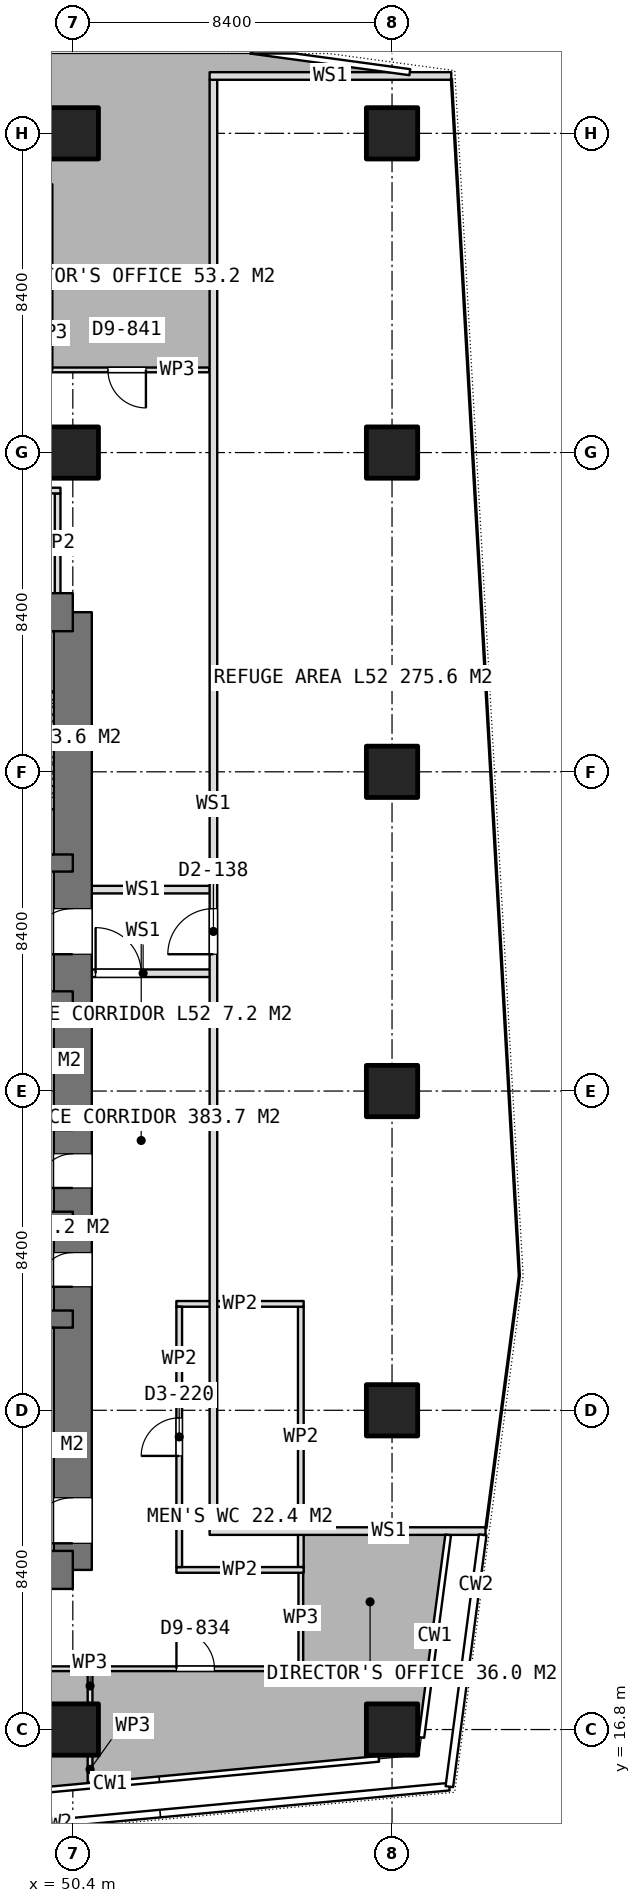
"""IFC4 building model, lengths in metres.
Left out: names, types, materials, properties, quantities, classifications, styles, units other than length and angle.
Written with IfcOpenShell. Run it as: python <this file> out.ifc"""

import sys

from ifc_helpers import new_model, si_unit, direction, frame, frame_2d, origin, origin_2d, place, context, subcontext, project, spatial, rectangle, extrude, element, fill, save


model = new_model("IFC4")
c1 = context("Model", 3, precision=1e-05, world=origin(), true_north=direction((0.0, 1.0)))
c2 = subcontext(c1, "Body", "Model", "MODEL_VIEW")
j1 = project(units=[si_unit("LENGTHUNIT", "METRE"), si_unit("PLANEANGLEUNIT", "RADIAN")], contexts=[c1])
p1 = place(None, origin())
s1 = spatial("IfcSite", under=j1, at=p1, CompositionType="ELEMENT")
p2 = place(p1, origin())
s2 = spatial("IfcBuilding", under=s1, at=p2, CompositionType="ELEMENT")
p3 = place(p2, frame((0.0, 0.0, 206.45)))
s3 = spatial("IfcBuildingStorey", under=s2, at=p3, CompositionType="ELEMENT", Elevation=206.45)
for number, where, z_axis, x_axis in (
    (1, (40.0, 21.0, 0.0), (0.0, 0.0, 1.0), (1.0, 0.0, 0.0)),
    (2, (40.0, 46.2, 0.0), (0.0, 0.0, 1.0), (1.0, 0.0, 0.0)),
):
    element("IfcWall", number, at=place(p3, frame(where, z_axis=z_axis, x_axis=x_axis)), inside=s3, PredefinedType="SHEAR", context=c2, shape_type="SweptSolid", body=[
        extrude(rectangle(XDim=10.4, YDim=1.0, at=frame_2d((5.2, 0.0))), origin(), (0.0, 0.0, 1.0), 3.75),
    ])
p4 = place(p3, frame((50.4, 21.0, 0.0), z_axis=(0.0, 0.0, 1.0), x_axis=(0.0, 1.0, 0.0)))
e3 = element("IfcWall", 3, at=p4, inside=s3, PredefinedType="SHEAR", context=c2, shape_type="SweptSolid", body=[
    extrude(rectangle(XDim=25.2, YDim=1.0, at=frame_2d((12.6, 0.0))), origin(), (0.0, 0.0, 1.0), 3.75),
])
p5 = place(p4, frame((16.2, 0.0, 0.0)))
e4 = element("IfcOpeningElement", 4, at=p5, cuts=e3, PredefinedType="OPENING", context=c2, shape_type="SweptSolid", body=[
    extrude(rectangle(XDim=1.2, YDim=2.1, at=frame_2d((0.6, 1.05))), frame((0.0, 0.51, 0.0), z_axis=(0.0, -1.0, 0.0), x_axis=(1.0, 0.0, 0.0)), (0.0, 0.0, 1.0), 1.02),
])
p6 = place(p4, frame((10.05, 0.0, 0.0)))
e5 = element("IfcOpeningElement", 5, at=p6, cuts=e3, PredefinedType="OPENING", context=c2, shape_type="SweptSolid", body=[
    extrude(rectangle(XDim=0.9, YDim=2.1, at=frame_2d((0.45, 1.05))), frame((0.0, 0.51, 0.0), z_axis=(0.0, -1.0, 0.0), x_axis=(1.0, 0.0, 0.0)), (0.0, 0.0, 1.0), 1.02),
])
p7 = place(p4, frame((7.45, 0.0, 0.0)))
e6 = element("IfcOpeningElement", 6, at=p7, cuts=e3, PredefinedType="OPENING", context=c2, shape_type="SweptSolid", body=[
    extrude(rectangle(XDim=0.9, YDim=2.1, at=frame_2d((0.45, 1.05))), frame((0.0, 0.51, 0.0), z_axis=(0.0, -1.0, 0.0), x_axis=(1.0, 0.0, 0.0)), (0.0, 0.0, 1.0), 1.02),
])
p8 = place(p4, frame((0.7, 0.0, 0.0)))
e7 = element("IfcOpeningElement", 7, at=p8, cuts=e3, PredefinedType="OPENING", context=c2, shape_type="SweptSolid", body=[
    extrude(rectangle(XDim=1.2, YDim=2.1, at=frame_2d((0.6, 1.05))), frame((0.0, 0.51, 0.0), z_axis=(0.0, -1.0, 0.0), x_axis=(1.0, 0.0, 0.0)), (0.0, 0.0, 1.0), 1.02),
])
for number, where, z_axis, x_axis in (
    (8, (43.8, 27.6, 0.0), (0.0, 0.0, 1.0), (1.0, 0.0, 0.0)),
    (9, (43.8, 30.2, 0.0), (0.0, 0.0, 1.0), (1.0, 0.0, 0.0)),
    (10, (43.8, 32.8, 0.0), (0.0, 0.0, 1.0), (1.0, 0.0, 0.0)),
):
    element("IfcWall", number, at=place(p3, frame(where, z_axis=z_axis, x_axis=x_axis)), inside=s3, PredefinedType="SHEAR", context=c2, shape_type="SweptSolid", body=[
        extrude(rectangle(XDim=6.6, YDim=0.45, at=frame_2d((3.3, 0.0))), origin(), (0.0, 0.0, 1.0), 3.75),
    ])
p9 = place(p3, frame((43.8, 36.0, 0.0), z_axis=(0.0, 0.0, 1.0), x_axis=(1.0, 0.0, 0.0)))
e11 = element("IfcWall", 11, at=p9, inside=s3, PredefinedType="SHEAR", context=c2, shape_type="SweptSolid", body=[
    extrude(rectangle(XDim=6.6, YDim=0.45, at=frame_2d((3.3, 0.0))), origin(), (0.0, 0.0, 1.0), 3.75),
])
p10 = place(p9, frame((2.65, 0.0, 0.0)))
e12 = element("IfcOpeningElement", 12, at=p10, cuts=e11, PredefinedType="OPENING", context=c2, shape_type="SweptSolid", body=[
    extrude(rectangle(XDim=1.3, YDim=2.1, at=frame_2d((0.65, 1.05))), frame((0.0, 0.235, 0.0), z_axis=(0.0, -1.0, 0.0), x_axis=(1.0, 0.0, 0.0)), (0.0, 0.0, 1.0), 0.47),
])
p11 = place(p3, frame((43.8, 39.6, 0.0), z_axis=(0.0, 0.0, 1.0), x_axis=(1.0, 0.0, 0.0)))
e13 = element("IfcWall", 13, at=p11, inside=s3, PredefinedType="SHEAR", context=c2, shape_type="SweptSolid", body=[
    extrude(rectangle(XDim=6.6, YDim=0.45, at=frame_2d((3.3, 0.0))), origin(), (0.0, 0.0, 1.0), 3.75),
])
p12 = place(p11, frame((0.425, 0.0, 0.0)))
e14 = element("IfcOpeningElement", 14, at=p12, cuts=e13, PredefinedType="OPENING", context=c2, shape_type="SweptSolid", body=[
    extrude(rectangle(XDim=1.2, YDim=2.1, at=frame_2d((0.6, 1.05))), frame((0.0, 0.235, 0.0), z_axis=(0.0, -1.0, 0.0), x_axis=(1.0, 0.0, 0.0)), (0.0, 0.0, 1.0), 0.47),
])
for number, where, z_axis, x_axis in (
    (15, (50.4, 16.8, 0.0), (0.0, 0.0, 1.0), (1.0, 0.0, 0.0)),
    (16, (50.4, 50.4, 0.0), (0.0, 0.0, 1.0), (1.0, 0.0, 0.0)),
    (17, (50.4, 58.8, 0.0), (0.0, 0.0, 1.0), (1.0, 0.0, 0.0)),
    (18, (58.8, 16.8, 0.0), (0.0, 0.0, 1.0), (1.0, 0.0, 0.0)),
    (19, (58.8, 25.2, 0.0), (0.0, 0.0, 1.0), (1.0, 0.0, 0.0)),
    (20, (58.8, 33.6, 0.0), (0.0, 0.0, 1.0), (1.0, 0.0, 0.0)),
    (21, (58.8, 42.0, 0.0), (0.0, 0.0, 1.0), (1.0, 0.0, 0.0)),
    (22, (58.8, 50.4, 0.0), (0.0, 0.0, 1.0), (1.0, 0.0, 0.0)),
    (23, (58.8, 58.8, 0.0), (0.0, 0.0, 1.0), (1.0, 0.0, 0.0)),
):
    element("IfcColumn", number, at=place(p3, frame(where, z_axis=z_axis, x_axis=x_axis)), inside=s3, PredefinedType="COLUMN", context=c2, shape_type="SweptSolid", body=[
        extrude(rectangle(XDim=1.35, YDim=1.35, at=origin_2d()), origin(), (0.0, 0.0, 1.0), 3.75),
    ])
p13 = place(p3, frame((40.325, 49.4, 0.0), z_axis=(0.0, 0.0, 1.0), x_axis=(1.0, 0.0, 0.0)))
e24 = element("IfcWall", 24, at=p13, inside=s3, PredefinedType="PARTITIONING", context=c2, shape_type="SweptSolid", body=[
    extrude(rectangle(XDim=9.75, YDim=0.15, at=frame_2d((4.875, 0.0))), origin(), (0.0, 0.0, 1.0), 3.5),
])
p14 = place(p13, frame((4.375, 0.0, 0.0)))
e25 = element("IfcOpeningElement", 25, at=p14, cuts=e24, PredefinedType="OPENING", context=c2, shape_type="SweptSolid", body=[
    extrude(rectangle(XDim=1.0, YDim=2.1, at=frame_2d((0.5, 1.05))), frame((0.0, 0.085, 0.0), z_axis=(0.0, -1.0, 0.0), x_axis=(1.0, 0.0, 0.0)), (0.0, 0.0, 1.0), 0.17),
])
p15 = place(p3, frame((50.0, 46.7, 0.0), z_axis=(0.0, 0.0, 1.0), x_axis=(0.0, 1.0, 0.0)))
e26 = element("IfcWall", 26, at=p15, inside=s3, PredefinedType="PARTITIONING", context=c2, shape_type="SweptSolid", body=[
    extrude(rectangle(XDim=2.625, YDim=0.15, at=frame_2d((1.312, 0.0))), origin(), (0.0, 0.0, 1.0), 3.5),
])
for number, where, z_axis, x_axis in (
    (27, (53.125, 21.0, 0.0), (0.0, 0.0, 1.0), (1.0, 0.0, 0.0)),
    (28, (53.125, 28.0, 0.0), (0.0, 0.0, 1.0), (1.0, 0.0, 0.0)),
):
    element("IfcWall", number, at=place(p3, frame(where, z_axis=z_axis, x_axis=x_axis)), inside=s3, PredefinedType="PARTITIONING", context=c2, shape_type="SweptSolid", body=[
        extrude(rectangle(XDim=3.35, YDim=0.15, at=frame_2d((1.675, 0.0))), origin(), (0.0, 0.0, 1.0), 3.5),
    ])
p16 = place(p3, frame((53.2, 21.075, 0.0), z_axis=(0.0, 0.0, 1.0), x_axis=(0.0, 1.0, 0.0)))
e29 = element("IfcWall", 29, at=p16, inside=s3, PredefinedType="PARTITIONING", context=c2, shape_type="SweptSolid", body=[
    extrude(rectangle(XDim=6.85, YDim=0.15, at=frame_2d((3.425, 0.0))), origin(), (0.0, 0.0, 1.0), 3.5),
])
p17 = place(p16, frame((2.925, 0.0, 0.0)))
e30 = element("IfcOpeningElement", 30, at=p17, cuts=e29, PredefinedType="OPENING", context=c2, shape_type="SweptSolid", body=[
    extrude(rectangle(XDim=1.0, YDim=2.1, at=frame_2d((0.5, 1.05))), frame((0.0, 0.085, 0.0), z_axis=(0.0, -1.0, 0.0), x_axis=(1.0, 0.0, 0.0)), (0.0, 0.0, 1.0), 0.17),
])
p18 = place(p3, frame((56.4, 21.075, 0.0), z_axis=(0.0, 0.0, 1.0), x_axis=(0.0, 1.0, 0.0)))
e31 = element("IfcWall", 31, at=p18, inside=s3, PredefinedType="PARTITIONING", context=c2, shape_type="SweptSolid", body=[
    extrude(rectangle(XDim=6.85, YDim=0.15, at=frame_2d((3.425, 0.0))), origin(), (0.0, 0.0, 1.0), 3.5),
])
p19 = place(p3, frame((50.854, 15.401, 0.0), z_axis=(0.0, 0.0, 1.0), x_axis=(0.0, 1.0, 0.0)))
e32 = element("IfcWall", 32, at=p19, inside=s3, PredefinedType="PARTITIONING", context=c2, shape_type="SweptSolid", body=[
    extrude(rectangle(XDim=0.704, YDim=0.125, at=frame_2d((0.352, 0.0))), origin(), (0.0, 0.0, 1.0), 3.5),
])
p20 = place(p3, frame((50.854, 17.495, 0.0), z_axis=(0.0, 0.0, 1.0), x_axis=(0.0, 1.0, 0.0)))
e33 = element("IfcWall", 33, at=p20, inside=s3, PredefinedType="PARTITIONING", context=c2, shape_type="SweptSolid", body=[
    extrude(rectangle(XDim=0.905, YDim=0.125, at=frame_2d((0.452, 0.0))), origin(), (0.0, 0.0, 1.0), 3.5),
])
p21 = place(p3, frame((50.854, 18.4, 0.0), z_axis=(0.0, 0.0, 1.0), x_axis=(1.0, 0.0, 0.0)))
e34 = element("IfcWall", 34, at=p21, inside=s3, PredefinedType="PARTITIONING", context=c2, shape_type="SweptSolid", body=[
    extrude(rectangle(XDim=5.546, YDim=0.125, at=frame_2d((2.773, 0.0))), origin(), (0.0, 0.0, 1.0), 3.5),
])
p22 = place(p21, frame((2.273, 0.0, 0.0)))
e35 = element("IfcOpeningElement", 35, at=p22, cuts=e34, PredefinedType="OPENING", context=c2, shape_type="SweptSolid", body=[
    extrude(rectangle(XDim=1.0, YDim=2.1, at=frame_2d((0.5, 1.05))), frame((0.0, 0.073, 0.0), z_axis=(0.0, -1.0, 0.0), x_axis=(1.0, 0.0, 0.0)), (0.0, 0.0, 1.0), 0.145),
])
p23 = place(p3, frame((56.4, 18.4, 0.0), z_axis=(0.0, 0.0, 1.0), x_axis=(0.0, 1.0, 0.0)))
e36 = element("IfcWall", 36, at=p23, inside=s3, PredefinedType="PARTITIONING", context=c2, shape_type="SweptSolid", body=[
    extrude(rectangle(XDim=2.675, YDim=0.125, at=frame_2d((1.337, 0.0))), origin(), (0.0, 0.0, 1.0), 3.5),
])
p24 = place(p3, frame((53.989, 52.575, 0.0), z_axis=(0.0, 0.0, 1.0), x_axis=(-1.0, 0.0, 0.0)))
e37 = element("IfcWall", 37, at=p24, inside=s3, PredefinedType="PARTITIONING", context=c2, shape_type="SweptSolid", body=[
    extrude(rectangle(XDim=4.19, YDim=0.125, at=frame_2d((2.095, 0.0))), origin(), (0.0, 0.0, 1.0), 3.5),
])
p25 = place(p24, frame((1.665, 0.0, 0.0)))
e38 = element("IfcOpeningElement", 38, at=p25, cuts=e37, PredefinedType="OPENING", context=c2, shape_type="SweptSolid", body=[
    extrude(rectangle(XDim=1.0, YDim=2.1, at=frame_2d((0.5, 1.05))), frame((0.0, 0.073, 0.0), z_axis=(0.0, -1.0, 0.0), x_axis=(1.0, 0.0, 0.0)), (0.0, 0.0, 1.0), 0.145),
])
p26 = place(p3, frame((49.799, 52.575, 0.0), z_axis=(0.0, 0.0, 1.0), x_axis=(0.0, 1.0, 0.0)))
e39 = element("IfcWall", 39, at=p26, inside=s3, PredefinedType="PARTITIONING", context=c2, shape_type="SweptSolid", body=[
    extrude(rectangle(XDim=4.884, YDim=0.125, at=frame_2d((2.442, 0.0))), origin(), (0.0, 0.0, 1.0), 3.5),
])
p27 = place(p3, frame((35.508, 18.4, 0.0), z_axis=(0.0, 0.0, 1.0), x_axis=(1.0, 0.0, 0.0)))
e40 = element("IfcWall", 40, at=p27, inside=s3, PredefinedType="PARTITIONING", context=c2, shape_type="SweptSolid", body=[
    extrude(rectangle(XDim=15.346, YDim=0.125, at=frame_2d((7.673, 0.0))), origin(), (0.0, 0.0, 1.0), 3.5),
])
p28 = place(p27, frame((7.273, 0.0, 0.0)))
e41 = element("IfcOpeningElement", 41, at=p28, cuts=e40, PredefinedType="OPENING", context=c2, shape_type="SweptSolid", body=[
    extrude(rectangle(XDim=1.8, YDim=2.1, at=frame_2d((0.9, 1.05))), frame((0.0, 0.073, 0.0), z_axis=(0.0, -1.0, 0.0), x_axis=(1.0, 0.0, 0.0)), (0.0, 0.0, 1.0), 0.145),
])
p29 = place(p3, frame((54.1, 22.122, 0.0), z_axis=(0.0, 0.0, 1.0), x_axis=(0.0, 1.0, 0.0)))
e42 = element("IfcWall", 42, at=p29, inside=s3, PredefinedType="PARTITIONING", context=c2, shape_type="SweptSolid", body=[
    extrude(rectangle(XDim=38.087, YDim=0.2, at=frame_2d((19.043, 0.0))), origin(), (0.0, 0.0, 1.0), 3.5),
])
p30 = place(p29, frame((15.078, 0.0, 0.0)))
e43 = element("IfcOpeningElement", 43, at=p30, cuts=e42, PredefinedType="OPENING", context=c2, shape_type="SweptSolid", body=[
    extrude(rectangle(XDim=1.2, YDim=2.1, at=frame_2d((0.6, 1.05))), frame((0.0, 0.11, 0.0), z_axis=(0.0, -1.0, 0.0), x_axis=(1.0, 0.0, 0.0)), (0.0, 0.0, 1.0), 0.22),
])
p31 = place(p3, frame((54.0, 22.022, 0.0), z_axis=(0.0, 0.0, 1.0), x_axis=(1.0, 0.0, 0.0)))
e44 = element("IfcWall", 44, at=p31, inside=s3, PredefinedType="PARTITIONING", context=c2, shape_type="SweptSolid", body=[
    extrude(rectangle(XDim=7.26, YDim=0.2, at=frame_2d((3.63, 0.0))), origin(), (0.0, 0.0, 1.0), 3.5),
])
p32 = place(p3, frame((54.0, 60.309, 0.0), z_axis=(0.0, 0.0, 1.0), x_axis=(1.0, 0.0, 0.0)))
e45 = element("IfcWall", 45, at=p32, inside=s3, PredefinedType="PARTITIONING", context=c2, shape_type="SweptSolid", body=[
    extrude(rectangle(XDim=6.358, YDim=0.2, at=frame_2d((3.179, 0.0))), origin(), (0.0, 0.0, 1.0), 3.5),
])
p33 = place(p3, frame((50.4, 38.9, 0.0), z_axis=(0.0, 0.0, 1.0), x_axis=(1.0, 0.0, 0.0)))
e46 = element("IfcWall", 46, at=p33, inside=s3, PredefinedType="PARTITIONING", context=c2, shape_type="SweptSolid", body=[
    extrude(rectangle(XDim=3.7, YDim=0.2, at=frame_2d((1.85, 0.0))), origin(), (0.0, 0.0, 1.0), 3.5),
])
p34 = place(p3, frame((50.4, 36.7, 0.0), z_axis=(0.0, 0.0, 1.0), x_axis=(1.0, 0.0, 0.0)))
e47 = element("IfcWall", 47, at=p34, inside=s3, PredefinedType="PARTITIONING", context=c2, shape_type="SweptSolid", body=[
    extrude(rectangle(XDim=3.7, YDim=0.2, at=frame_2d((1.85, 0.0))), origin(), (0.0, 0.0, 1.0), 3.5),
])
p35 = place(p34, frame((0.6, 0.0, 0.0)))
e48 = element("IfcOpeningElement", 48, at=p35, cuts=e47, PredefinedType="OPENING", context=c2, shape_type="SweptSolid", body=[
    extrude(rectangle(XDim=1.2, YDim=2.1, at=frame_2d((0.6, 1.05))), frame((0.0, 0.11, 0.0), z_axis=(0.0, -1.0, 0.0), x_axis=(1.0, 0.0, 0.0)), (0.0, 0.0, 1.0), 0.22),
])
p36 = place(p5, origin())
e49 = element("IfcDoor", 49, at=p36, inside=s3, OperationType="SINGLE_SWING_LEFT", PredefinedType="DOOR", context=c2, shape_type="SweptSolid", body=[
    extrude(rectangle(XDim=1.2, YDim=2.1, at=frame_2d((0.6, 1.05))), frame((0.0, 0.025, 0.0), z_axis=(0.0, -1.0, 0.0), x_axis=(1.0, 0.0, 0.0)), (0.0, 0.0, 1.0), 0.05),
])
fill(e4, e49)
p37 = place(p6, origin())
e50 = element("IfcDoor", 50, at=p37, inside=s3, OperationType="SINGLE_SWING_LEFT", PredefinedType="DOOR", context=c2, shape_type="SweptSolid", body=[
    extrude(rectangle(XDim=0.9, YDim=2.1, at=frame_2d((0.45, 1.05))), frame((0.0, 0.025, 0.0), z_axis=(0.0, -1.0, 0.0), x_axis=(1.0, 0.0, 0.0)), (0.0, 0.0, 1.0), 0.05),
])
fill(e5, e50)
p38 = place(p7, origin())
e51 = element("IfcDoor", 51, at=p38, inside=s3, OperationType="SINGLE_SWING_LEFT", PredefinedType="DOOR", context=c2, shape_type="SweptSolid", body=[
    extrude(rectangle(XDim=0.9, YDim=2.1, at=frame_2d((0.45, 1.05))), frame((0.0, 0.025, 0.0), z_axis=(0.0, -1.0, 0.0), x_axis=(1.0, 0.0, 0.0)), (0.0, 0.0, 1.0), 0.05),
])
fill(e6, e51)
p39 = place(p17, origin())
e52 = element("IfcDoor", 52, at=p39, inside=s3, OperationType="SINGLE_SWING_LEFT", PredefinedType="DOOR", context=c2, shape_type="SweptSolid", body=[
    extrude(rectangle(XDim=1.0, YDim=2.1, at=frame_2d((0.5, 1.05))), frame((0.0, 0.025, 0.0), z_axis=(0.0, -1.0, 0.0), x_axis=(1.0, 0.0, 0.0)), (0.0, 0.0, 1.0), 0.05),
])
fill(e30, e52)
p40 = place(p22, origin())
e53 = element("IfcDoor", 53, at=p40, inside=s3, OperationType="SINGLE_SWING_LEFT", PredefinedType="DOOR", context=c2, shape_type="SweptSolid", body=[
    extrude(rectangle(XDim=1.0, YDim=2.1, at=frame_2d((0.5, 1.05))), frame((0.0, 0.025, 0.0), z_axis=(0.0, -1.0, 0.0), x_axis=(1.0, 0.0, 0.0)), (0.0, 0.0, 1.0), 0.05),
])
fill(e35, e53)
p41 = place(p25, origin())
e54 = element("IfcDoor", 54, at=p41, inside=s3, OperationType="SINGLE_SWING_LEFT", PredefinedType="DOOR", context=c2, shape_type="SweptSolid", body=[
    extrude(rectangle(XDim=1.0, YDim=2.1, at=frame_2d((0.5, 1.05))), frame((0.0, 0.025, 0.0), z_axis=(0.0, -1.0, 0.0), x_axis=(1.0, 0.0, 0.0)), (0.0, 0.0, 1.0), 0.05),
])
fill(e38, e54)
p42 = place(p8, origin())
e55 = element("IfcDoor", 55, at=p42, inside=s3, OperationType="SINGLE_SWING_RIGHT", PredefinedType="DOOR", context=c2, shape_type="SweptSolid", body=[
    extrude(rectangle(XDim=1.2, YDim=2.1, at=frame_2d((0.6, 1.05))), frame((0.0, 0.025, 0.0), z_axis=(0.0, -1.0, 0.0), x_axis=(1.0, 0.0, 0.0)), (0.0, 0.0, 1.0), 0.05),
])
fill(e7, e55)
p43 = place(p30, origin())
e56 = element("IfcDoor", 56, at=p43, inside=s3, OperationType="SINGLE_SWING_LEFT", PredefinedType="DOOR", context=c2, shape_type="SweptSolid", body=[
    extrude(rectangle(XDim=1.2, YDim=2.1, at=frame_2d((0.6, 1.05))), frame((0.0, 0.025, 0.0), z_axis=(0.0, -1.0, 0.0), x_axis=(1.0, 0.0, 0.0)), (0.0, 0.0, 1.0), 0.05),
])
fill(e43, e56)
p44 = place(p35, origin())
e57 = element("IfcDoor", 57, at=p44, inside=s3, OperationType="SINGLE_SWING_LEFT", PredefinedType="DOOR", context=c2, shape_type="SweptSolid", body=[
    extrude(rectangle(XDim=1.2, YDim=2.1, at=frame_2d((0.6, 1.05))), frame((0.0, 0.025, 0.0), z_axis=(0.0, -1.0, 0.0), x_axis=(1.0, 0.0, 0.0)), (0.0, 0.0, 1.0), 0.05),
])
fill(e48, e57)
save(model, sys.argv[1])
